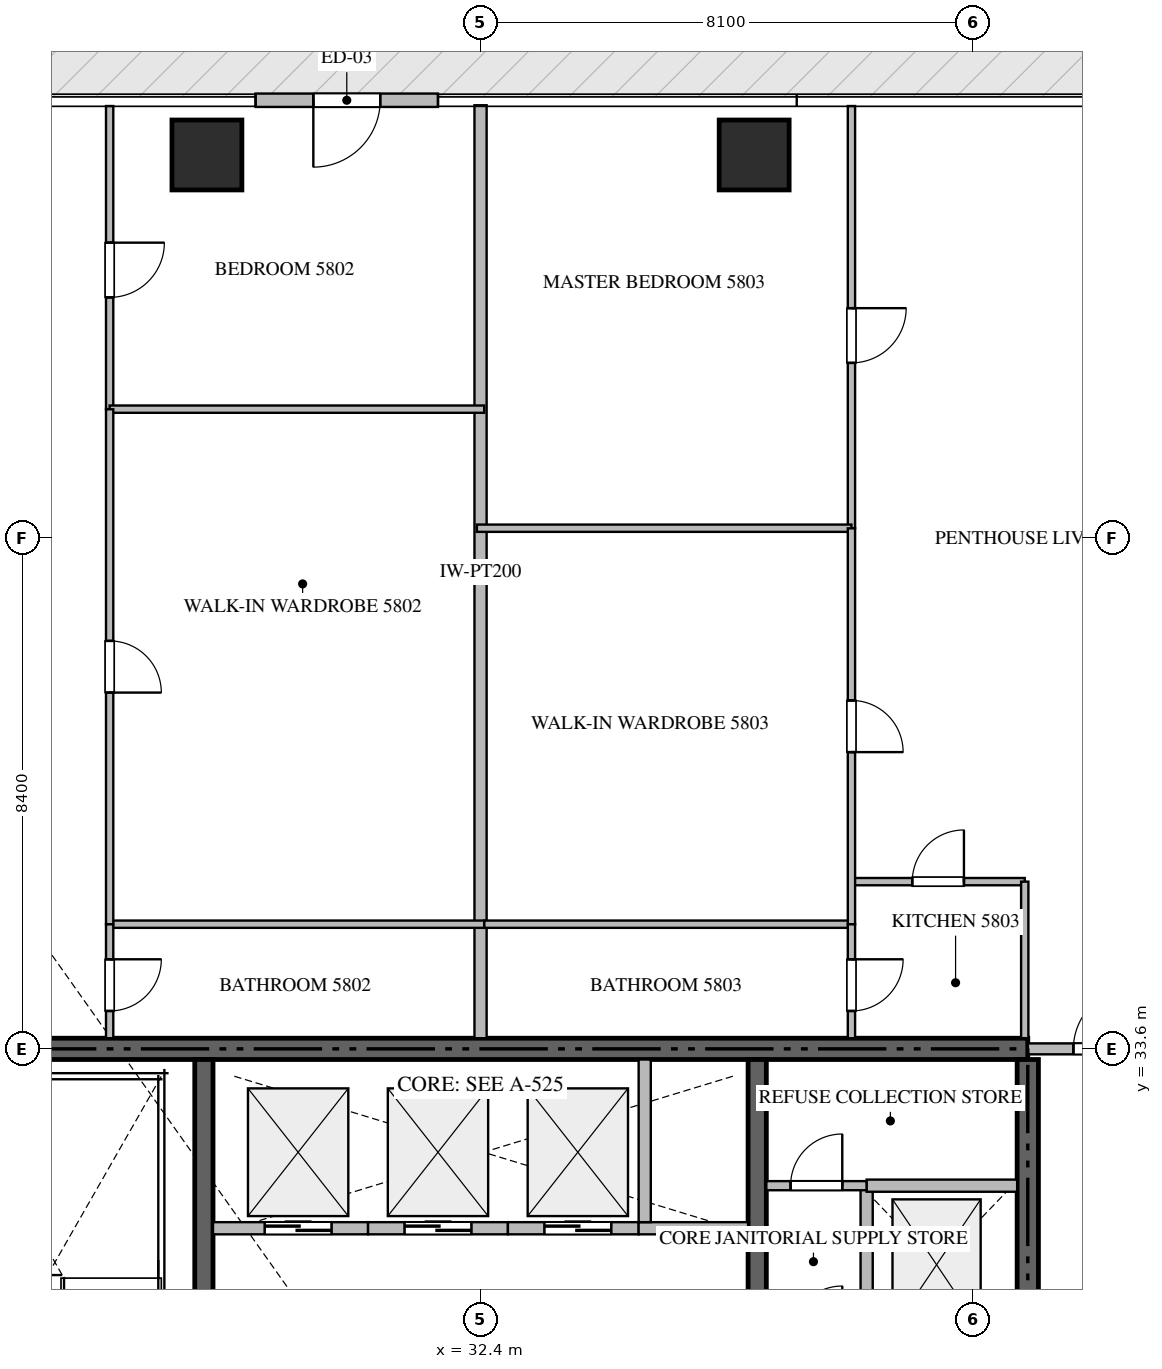
"""IFC4 building model, lengths in metres.
Left out: names, types, materials, properties, quantities, classifications, styles, units other than length and angle.
Written with IfcOpenShell. Run it as: python <this file> out.ifc"""

import sys

from ifc_helpers import new_model, si_unit, direction, frame, frame_2d, origin, origin_2d, place, context, subcontext, project, spatial, rectangle, extrude, source, transform, mapped, element, fill, save


model = new_model("IFC4")
c1 = context("Model", 3, precision=1e-05, world=origin(), true_north=direction((0.0, 1.0)))
c2 = subcontext(c1, "Body", "Model", "MODEL_VIEW")
j1 = project(units=[si_unit("LENGTHUNIT", "METRE"), si_unit("PLANEANGLEUNIT", "RADIAN")], contexts=[c1])
p1 = place(None, origin())
s1 = spatial("IfcSite", under=j1, at=p1, CompositionType="ELEMENT")
p2 = place(p1, origin())
s2 = spatial("IfcBuilding", under=s1, at=p2, CompositionType="ELEMENT")
p3 = place(p2, frame((0.0, 0.0, 233.55)))
s3 = spatial("IfcBuildingStorey", under=s2, at=p3, CompositionType="ELEMENT", Elevation=233.55)
p4 = place(p3, frame((41.4, 33.6, -0.26), z_axis=(0.0, 0.0, 1.0), x_axis=(-1.0, 0.0, 0.0)))
e1 = element("IfcWall", 1, at=p4, inside=s3, PredefinedType="SHEAR", context=c2, shape_type="SweptSolid", body=[
    extrude(rectangle(XDim=18.0, YDim=0.35, at=frame_2d((9.0, 0.0))), origin(), (0.0, 0.0, 1.0), 3.848),
])
p5 = place(p3, frame((41.4, 27.75, -0.26), z_axis=(0.0, 0.0, 1.0), x_axis=(0.0, 1.0, 0.0)))
e2 = element("IfcWall", 2, at=p5, inside=s3, PredefinedType="SHEAR", context=c2, shape_type="SweptSolid", body=[
    extrude(rectangle(XDim=5.675, YDim=0.35, at=frame_2d((2.837, 0.0))), origin(), (0.0, 0.0, 1.0), 3.848),
])
p6 = place(p3, frame((27.85, 23.55, -0.26), z_axis=(0.0, 0.0, 1.0), x_axis=(0.0, 1.0, 0.0)))
e3 = element("IfcWall", 3, at=p6, inside=s3, PredefinedType="SHEAR", context=c2, shape_type="SweptSolid", body=[
    extrude(rectangle(XDim=9.875, YDim=0.3, at=frame_2d((4.938, 0.0))), origin(), (0.0, 0.0, 1.0), 3.848),
])
p7 = place(p3, frame((36.95, 27.05, -0.26), z_axis=(0.0, 0.0, 1.0), x_axis=(0.0, 1.0, 0.0)))
e4 = element("IfcWall", 4, at=p7, inside=s3, PredefinedType="SHEAR", context=c2, shape_type="SweptSolid", body=[
    extrude(rectangle(XDim=6.375, YDim=0.3, at=frame_2d((3.188, 0.0))), origin(), (0.0, 0.0, 1.0), 3.848),
])
m1 = source(origin(), c2, "Body", "SweptSolid", [
    extrude(rectangle(XDim=1.15, YDim=1.15, at=origin_2d()), origin(), (0.0, 0.0, 1.0), 3.85),
])
for number, where, z_axis, x_axis in (
    (5, (27.9, 48.3, -0.26), (0.0, 0.0, 1.0), (1.0, 0.0, 0.0)),
    (6, (36.9, 48.3, -0.26), (0.0, 0.0, 1.0), (1.0, 0.0, 0.0)),
):
    element("IfcColumn", number, at=place(p3, frame(where, z_axis=z_axis, x_axis=x_axis)), inside=s3, PredefinedType="COLUMN", context=c2, shape_type="MappedRepresentation", body=[
        mapped(m1, transform((0.0, 0.0, 0.0), scale=1.0)),
    ])
p8 = place(p3, frame((31.7, 49.2, 0.0), z_axis=(0.0, 0.0, 1.0), x_axis=(-1.0, 0.0, 0.0)))
e7 = element("IfcWall", 7, at=p8, inside=s3, PredefinedType="ELEMENTEDWALL", context=c2, shape_type="SweptSolid", body=[
    extrude(rectangle(XDim=3.0, YDim=0.22, at=frame_2d((1.5, 0.0))), origin(), (0.0, 0.0, 1.0), 3.575),
])
p9 = place(p8, frame((0.95, 0.0, 0.0)))
e8 = element("IfcOpeningElement", 8, at=p9, cuts=e7, PredefinedType="OPENING", context=c2, shape_type="SweptSolid", body=[
    extrude(rectangle(XDim=1.1, YDim=2.2, at=frame_2d((0.55, 1.1))), frame((0.0, 0.12, 0.0), z_axis=(0.0, -1.0, 0.0), x_axis=(1.0, 0.0, 0.0)), (0.0, 0.0, 1.0), 0.24),
])
p10 = place(p3, frame((28.0, 30.65, 0.0), z_axis=(0.0, 0.0, 1.0), x_axis=(1.0, 0.0, 0.0)))
e9 = element("IfcWall", 9, at=p10, inside=s3, PredefinedType="STANDARD", context=c2, shape_type="SweptSolid", body=[
    extrude(rectangle(XDim=2.55, YDim=0.2, at=frame_2d((1.275, 0.0))), origin(), (0.0, 0.0, 1.0), 3.59),
])
p11 = place(p10, frame((0.85, 0.0, 0.0)))
e10 = element("IfcOpeningElement", 10, at=p11, cuts=e9, PredefinedType="OPENING", context=c2, shape_type="SweptSolid", body=[
    extrude(rectangle(XDim=1.1, YDim=2.2, at=frame_2d((0.55, 1.1))), frame((0.0, 0.11, 0.0), z_axis=(0.0, -1.0, 0.0), x_axis=(1.0, 0.0, 0.0)), (0.0, 0.0, 1.0), 0.22),
])
p12 = place(p3, frame((30.55, 30.65, 0.0), z_axis=(0.0, 0.0, 1.0), x_axis=(1.0, 0.0, 0.0)))
e11 = element("IfcWall", 11, at=p12, inside=s3, PredefinedType="STANDARD", context=c2, shape_type="SweptSolid", body=[
    extrude(rectangle(XDim=2.3, YDim=0.2, at=frame_2d((1.15, 0.0))), origin(), (0.0, 0.0, 1.0), 3.59),
])
p13 = place(p12, frame((0.6, 0.0, 0.0)))
e12 = element("IfcOpeningElement", 12, at=p13, cuts=e11, PredefinedType="OPENING", context=c2, shape_type="SweptSolid", body=[
    extrude(rectangle(XDim=1.1, YDim=2.2, at=frame_2d((0.55, 1.1))), frame((0.0, 0.11, 0.0), z_axis=(0.0, -1.0, 0.0), x_axis=(1.0, 0.0, 0.0)), (0.0, 0.0, 1.0), 0.22),
])
p14 = place(p3, frame((32.85, 30.65, 0.0), z_axis=(0.0, 0.0, 1.0), x_axis=(1.0, 0.0, 0.0)))
e13 = element("IfcWall", 13, at=p14, inside=s3, PredefinedType="STANDARD", context=c2, shape_type="SweptSolid", body=[
    extrude(rectangle(XDim=2.15, YDim=0.2, at=frame_2d((1.075, 0.0))), origin(), (0.0, 0.0, 1.0), 3.59),
])
p15 = place(p14, frame((0.6, 0.0, 0.0)))
e14 = element("IfcOpeningElement", 14, at=p15, cuts=e13, PredefinedType="OPENING", context=c2, shape_type="SweptSolid", body=[
    extrude(rectangle(XDim=1.1, YDim=2.2, at=frame_2d((0.55, 1.1))), frame((0.0, 0.11, 0.0), z_axis=(0.0, -1.0, 0.0), x_axis=(1.0, 0.0, 0.0)), (0.0, 0.0, 1.0), 0.22),
])
p16 = place(p3, frame((35.0, 30.65, 0.0), z_axis=(0.0, 0.0, 1.0), x_axis=(1.0, 0.0, 0.0)))
e15 = element("IfcWall", 15, at=p16, inside=s3, PredefinedType="STANDARD", context=c2, shape_type="SweptSolid", body=[
    extrude(rectangle(XDim=1.8, YDim=0.2, at=frame_2d((0.9, 0.0))), origin(), (0.0, 0.0, 1.0), 3.59),
])
p17 = place(p3, frame((35.1, 30.75, 0.0), z_axis=(0.0, 0.0, 1.0), x_axis=(0.0, 1.0, 0.0)))
e16 = element("IfcWall", 16, at=p17, inside=s3, PredefinedType="STANDARD", context=c2, shape_type="SweptSolid", body=[
    extrude(rectangle(XDim=2.675, YDim=0.2, at=frame_2d((1.337, 0.0))), origin(), (0.0, 0.0, 1.0), 3.59),
])
p18 = place(p3, frame((38.75, 28.85, 0.0), z_axis=(0.0, 0.0, 1.0), x_axis=(0.0, 1.0, 0.0)))
e17 = element("IfcWall", 17, at=p18, inside=s3, PredefinedType="STANDARD", context=c2, shape_type="SweptSolid", body=[
    extrude(rectangle(XDim=2.5, YDim=0.2, at=frame_2d((1.25, 0.0))), origin(), (0.0, 0.0, 1.0), 3.59),
])
p19 = place(p3, frame((38.75, 31.35, 0.0), z_axis=(0.0, 0.0, 1.0), x_axis=(1.0, 0.0, 0.0)))
e18 = element("IfcWall", 18, at=p19, inside=s3, PredefinedType="STANDARD", context=c2, shape_type="SweptSolid", body=[
    extrude(rectangle(XDim=2.475, YDim=0.2, at=frame_2d((1.238, 0.0))), origin(), (0.0, 0.0, 1.0), 3.59),
])
p20 = place(p3, frame((37.1, 31.35, 0.0), z_axis=(0.0, 0.0, 1.0), x_axis=(1.0, 0.0, 0.0)))
e19 = element("IfcWall", 19, at=p20, inside=s3, PredefinedType="PARTITIONING", context=c2, shape_type="SweptSolid", body=[
    extrude(rectangle(XDim=1.648, YDim=0.15, at=frame_2d((0.824, 0.0))), origin(), (0.0, 0.0, 1.0), 3.59),
])
p21 = place(p20, frame((0.399, 0.0, 0.0)))
e20 = element("IfcOpeningElement", 20, at=p21, cuts=e19, PredefinedType="OPENING", context=c2, shape_type="SweptSolid", body=[
    extrude(rectangle(XDim=0.85, YDim=2.1, at=frame_2d((0.425, 1.05))), frame((0.0, 0.085, 0.0), z_axis=(0.0, -1.0, 0.0), x_axis=(1.0, 0.0, 0.0)), (0.0, 0.0, 1.0), 0.17),
])
p22 = place(p3, frame((32.4, 33.775, 0.0), z_axis=(0.0, 0.0, 1.0), x_axis=(0.0, 1.0, 0.0)))
e21 = element("IfcWall", 21, at=p22, inside=s3, PredefinedType="PARTITIONING", context=c2, shape_type="SweptSolid", body=[
    extrude(rectangle(XDim=15.343, YDim=0.2, at=frame_2d((7.671, 0.0))), origin(), (0.0, 0.0, 1.0), 3.59),
])
p23 = place(p3, frame((41.402, 33.6, 0.0), z_axis=(0.0, 0.0, 1.0), x_axis=(1.0, 0.0, 0.0)))
e22 = element("IfcWall", 22, at=p23, inside=s3, PredefinedType="PARTITIONING", context=c2, shape_type="SweptSolid", body=[
    extrude(rectangle(XDim=2.496, YDim=0.18, at=frame_2d((1.248, 0.0))), origin(), (0.0, 0.0, 1.0), 3.59),
])
p24 = place(p23, frame((0.748, 0.0, 0.0)))
e23 = element("IfcOpeningElement", 23, at=p24, cuts=e22, PredefinedType="OPENING", context=c2, shape_type="SweptSolid", body=[
    extrude(rectangle(XDim=1.0, YDim=2.15, at=frame_2d((0.5, 1.075))), frame((0.0, 0.1, 0.0), z_axis=(0.0, -1.0, 0.0), x_axis=(1.0, 0.0, 0.0)), (0.0, 0.0, 1.0), 0.2),
])
p25 = place(p3, frame((26.3, 49.105, 0.0), z_axis=(0.0, 0.0, 1.0), x_axis=(0.0, -1.0, 0.0)))
e24 = element("IfcWall", 24, at=p25, inside=s3, PredefinedType="PARTITIONING", context=c2, shape_type="SweptSolid", body=[
    extrude(rectangle(XDim=4.985, YDim=0.12, at=frame_2d((2.492, 0.0))), origin(), (0.0, 0.0, 1.0), 3.59),
])
p26 = place(p25, frame((2.247, 0.0, 0.0)))
e25 = element("IfcOpeningElement", 25, at=p26, cuts=e24, PredefinedType="OPENING", context=c2, shape_type="SweptSolid", body=[
    extrude(rectangle(XDim=0.9, YDim=2.1, at=frame_2d((0.45, 1.05))), frame((0.0, 0.07, 0.0), z_axis=(0.0, -1.0, 0.0), x_axis=(1.0, 0.0, 0.0)), (0.0, 0.0, 1.0), 0.14),
])
for number, where, z_axis, x_axis in (
    (26, (26.3, 44.12, 0.0), (0.0, 0.0, 1.0), (1.0, 0.0, 0.0)),
    (27, (26.3, 35.65, 0.0), (0.0, 0.0, 1.0), (1.0, 0.0, 0.0)),
):
    element("IfcWall", number, at=place(p3, frame(where, z_axis=z_axis, x_axis=x_axis)), inside=s3, PredefinedType="PARTITIONING", context=c2, shape_type="SweptSolid", body=[
        extrude(rectangle(XDim=6.16, YDim=0.12, at=frame_2d((3.08, 0.0))), origin(), (0.0, 0.0, 1.0), 3.59),
    ])
p27 = place(p3, frame((26.3, 44.118, 0.0), z_axis=(0.0, 0.0, 1.0), x_axis=(0.0, -1.0, 0.0)))
e28 = element("IfcWall", 28, at=p27, inside=s3, PredefinedType="PARTITIONING", context=c2, shape_type="SweptSolid", body=[
    extrude(rectangle(XDim=8.468, YDim=0.12, at=frame_2d((4.234, 0.0))), origin(), (0.0, 0.0, 1.0), 3.59),
])
p28 = place(p27, frame((3.809, 0.0, 0.0)))
e29 = element("IfcOpeningElement", 29, at=p28, cuts=e28, PredefinedType="OPENING", context=c2, shape_type="SweptSolid", body=[
    extrude(rectangle(XDim=0.85, YDim=2.1, at=frame_2d((0.425, 1.05))), frame((0.0, 0.07, 0.0), z_axis=(0.0, -1.0, 0.0), x_axis=(1.0, 0.0, 0.0)), (0.0, 0.0, 1.0), 0.14),
])
p29 = place(p3, frame((26.3, 35.648, 0.0), z_axis=(0.0, 0.0, 1.0), x_axis=(0.0, -1.0, 0.0)))
e30 = element("IfcWall", 30, at=p29, inside=s3, PredefinedType="PARTITIONING", context=c2, shape_type="SweptSolid", body=[
    extrude(rectangle(XDim=1.873, YDim=0.12, at=frame_2d((0.937, 0.0))), origin(), (0.0, 0.0, 1.0), 3.59),
])
p30 = place(p29, frame((0.575, 0.0, 0.0)))
e31 = element("IfcOpeningElement", 31, at=p30, cuts=e30, PredefinedType="OPENING", context=c2, shape_type="SweptSolid", body=[
    extrude(rectangle(XDim=0.85, YDim=2.1, at=frame_2d((0.425, 1.05))), frame((0.0, 0.07, 0.0), z_axis=(0.0, -1.0, 0.0), x_axis=(1.0, 0.0, 0.0)), (0.0, 0.0, 1.0), 0.14),
])
p31 = place(p3, frame((38.5, 36.35, 0.0), z_axis=(0.0, 0.0, 1.0), x_axis=(1.0, 0.0, 0.0)))
e32 = element("IfcWall", 32, at=p31, inside=s3, PredefinedType="PARTITIONING", context=c2, shape_type="SweptSolid", body=[
    extrude(rectangle(XDim=2.85, YDim=0.12, at=frame_2d((1.425, 0.0))), origin(), (0.0, 0.0, 1.0), 3.59),
])
p32 = place(p31, frame((1.0, 0.0, 0.0)))
e33 = element("IfcOpeningElement", 33, at=p32, cuts=e32, PredefinedType="OPENING", context=c2, shape_type="SweptSolid", body=[
    extrude(rectangle(XDim=0.85, YDim=2.1, at=frame_2d((0.425, 1.05))), frame((0.0, 0.07, 0.0), z_axis=(0.0, -1.0, 0.0), x_axis=(1.0, 0.0, 0.0)), (0.0, 0.0, 1.0), 0.14),
])
p33 = place(p3, frame((41.35, 36.35, 0.0), z_axis=(0.0, 0.0, 1.0), x_axis=(0.0, -1.0, 0.0)))
e34 = element("IfcWall", 34, at=p33, inside=s3, PredefinedType="PARTITIONING", context=c2, shape_type="SweptSolid", body=[
    extrude(rectangle(XDim=2.575, YDim=0.12, at=frame_2d((1.288, 0.0))), origin(), (0.0, 0.0, 1.0), 3.59),
])
p34 = place(p3, frame((38.5, 49.105, 0.0), z_axis=(0.0, 0.0, 1.0), x_axis=(0.0, -1.0, 0.0)))
e35 = element("IfcWall", 35, at=p34, inside=s3, PredefinedType="PARTITIONING", context=c2, shape_type="SweptSolid", body=[
    extrude(rectangle(XDim=6.943, YDim=0.12, at=frame_2d((3.471, 0.0))), origin(), (0.0, 0.0, 1.0), 3.59),
])
p35 = place(p34, frame((3.324, 0.0, 0.0)))
e36 = element("IfcOpeningElement", 36, at=p35, cuts=e35, PredefinedType="OPENING", context=c2, shape_type="SweptSolid", body=[
    extrude(rectangle(XDim=0.9, YDim=2.1, at=frame_2d((0.45, 1.05))), frame((0.0, 0.07, 0.0), z_axis=(0.0, -1.0, 0.0), x_axis=(1.0, 0.0, 0.0)), (0.0, 0.0, 1.0), 0.14),
])
p36 = place(p3, frame((32.34, 42.162, 0.0), z_axis=(0.0, 0.0, 1.0), x_axis=(1.0, 0.0, 0.0)))
e37 = element("IfcWall", 37, at=p36, inside=s3, PredefinedType="PARTITIONING", context=c2, shape_type="SweptSolid", body=[
    extrude(rectangle(XDim=6.16, YDim=0.12, at=frame_2d((3.08, 0.0))), origin(), (0.0, 0.0, 1.0), 3.59),
])
p37 = place(p3, frame((32.462, 35.65, 0.0), z_axis=(0.0, 0.0, 1.0), x_axis=(1.0, 0.0, 0.0)))
e38 = element("IfcWall", 38, at=p37, inside=s3, PredefinedType="PARTITIONING", context=c2, shape_type="SweptSolid", body=[
    extrude(rectangle(XDim=6.038, YDim=0.12, at=frame_2d((3.019, 0.0))), origin(), (0.0, 0.0, 1.0), 3.59),
])
p38 = place(p3, frame((38.5, 42.16, 0.0), z_axis=(0.0, 0.0, 1.0), x_axis=(0.0, -1.0, 0.0)))
e39 = element("IfcWall", 39, at=p38, inside=s3, PredefinedType="PARTITIONING", context=c2, shape_type="SweptSolid", body=[
    extrude(rectangle(XDim=6.51, YDim=0.12, at=frame_2d((3.255, 0.0))), origin(), (0.0, 0.0, 1.0), 3.59),
])
p39 = place(p38, frame((2.83, 0.0, 0.0)))
e40 = element("IfcOpeningElement", 40, at=p39, cuts=e39, PredefinedType="OPENING", context=c2, shape_type="SweptSolid", body=[
    extrude(rectangle(XDim=0.85, YDim=2.1, at=frame_2d((0.425, 1.05))), frame((0.0, 0.07, 0.0), z_axis=(0.0, -1.0, 0.0), x_axis=(1.0, 0.0, 0.0)), (0.0, 0.0, 1.0), 0.14),
])
p40 = place(p3, frame((38.5, 35.648, 0.0), z_axis=(0.0, 0.0, 1.0), x_axis=(0.0, -1.0, 0.0)))
e41 = element("IfcWall", 41, at=p40, inside=s3, PredefinedType="PARTITIONING", context=c2, shape_type="SweptSolid", body=[
    extrude(rectangle(XDim=1.873, YDim=0.12, at=frame_2d((0.937, 0.0))), origin(), (0.0, 0.0, 1.0), 3.59),
])
p41 = place(p40, frame((0.575, 0.0, 0.0)))
e42 = element("IfcOpeningElement", 42, at=p41, cuts=e41, PredefinedType="OPENING", context=c2, shape_type="SweptSolid", body=[
    extrude(rectangle(XDim=0.85, YDim=2.1, at=frame_2d((0.425, 1.05))), frame((0.0, 0.07, 0.0), z_axis=(0.0, -1.0, 0.0), x_axis=(1.0, 0.0, 0.0)), (0.0, 0.0, 1.0), 0.14),
])
m2 = source(origin(), c2, "Body", "SweptSolid", [
    extrude(rectangle(XDim=1.1, YDim=2.2, at=frame_2d((0.55, 1.1))), frame((0.0, 0.025, 0.0), z_axis=(0.0, -1.0, 0.0), x_axis=(1.0, 0.0, 0.0)), (0.0, 0.0, 1.0), 0.05),
])
p42 = place(p9, origin())
e43 = element("IfcDoor", 43, at=p42, inside=s3, OperationType="SINGLE_SWING_RIGHT", PredefinedType="DOOR", context=c2, shape_type="MappedRepresentation", body=[
    mapped(m2, transform((0.0, 0.0, 0.0), scale=1.0)),
])
fill(e8, e43)
p43 = place(p11, origin())
e44 = element("IfcDoor", 44, at=p43, inside=s3, OperationType="DOUBLE_DOOR_SLIDING", PredefinedType="DOOR", context=c2, shape_type="MappedRepresentation", body=[
    mapped(m2, transform((0.0, 0.0, 0.0), scale=1.0)),
])
fill(e10, e44)
p44 = place(p13, origin())
e45 = element("IfcDoor", 45, at=p44, inside=s3, OperationType="DOUBLE_DOOR_SLIDING", PredefinedType="DOOR", context=c2, shape_type="MappedRepresentation", body=[
    mapped(m2, transform((0.0, 0.0, 0.0), scale=1.0)),
])
fill(e12, e45)
p45 = place(p15, origin())
e46 = element("IfcDoor", 46, at=p45, inside=s3, OperationType="DOUBLE_DOOR_SLIDING", PredefinedType="DOOR", context=c2, shape_type="MappedRepresentation", body=[
    mapped(m2, transform((0.0, 0.0, 0.0), scale=1.0)),
])
fill(e14, e46)
m3 = source(origin(), c2, "Body", "SweptSolid", [
    extrude(rectangle(XDim=0.85, YDim=2.1, at=frame_2d((0.425, 1.05))), frame((0.0, 0.025, 0.0), z_axis=(0.0, -1.0, 0.0), x_axis=(1.0, 0.0, 0.0)), (0.0, 0.0, 1.0), 0.05),
])
p46 = place(p21, origin())
e47 = element("IfcDoor", 47, at=p46, inside=s3, OperationType="SINGLE_SWING_RIGHT", PredefinedType="DOOR", context=c2, shape_type="MappedRepresentation", body=[
    mapped(m3, transform((0.0, 0.0, 0.0), scale=1.0)),
])
fill(e20, e47)
m4 = source(origin(), c2, "Body", "SweptSolid", [
    extrude(rectangle(XDim=1.0, YDim=2.15, at=frame_2d((0.5, 1.075))), frame((0.0, 0.025, 0.0), z_axis=(0.0, -1.0, 0.0), x_axis=(1.0, 0.0, 0.0)), (0.0, 0.0, 1.0), 0.05),
])
p47 = place(p24, origin())
e48 = element("IfcDoor", 48, at=p47, inside=s3, OperationType="SINGLE_SWING_RIGHT", PredefinedType="DOOR", context=c2, shape_type="MappedRepresentation", body=[
    mapped(m4, transform((0.0, 0.0, 0.0), scale=1.0)),
])
fill(e23, e48)
m5 = source(origin(), c2, "Body", "SweptSolid", [
    extrude(rectangle(XDim=0.9, YDim=2.1, at=frame_2d((0.45, 1.05))), frame((0.0, 0.025, 0.0), z_axis=(0.0, -1.0, 0.0), x_axis=(1.0, 0.0, 0.0)), (0.0, 0.0, 1.0), 0.05),
])
p48 = place(p26, origin())
e49 = element("IfcDoor", 49, at=p48, inside=s3, OperationType="SINGLE_SWING_LEFT", PredefinedType="DOOR", context=c2, shape_type="MappedRepresentation", body=[
    mapped(m5, transform((0.0, 0.0, 0.0), scale=1.0)),
])
fill(e25, e49)
p49 = place(p28, origin())
e50 = element("IfcDoor", 50, at=p49, inside=s3, OperationType="SINGLE_SWING_RIGHT", PredefinedType="DOOR", context=c2, shape_type="MappedRepresentation", body=[
    mapped(m3, transform((0.0, 0.0, 0.0), scale=1.0)),
])
fill(e29, e50)
p50 = place(p30, origin())
e51 = element("IfcDoor", 51, at=p50, inside=s3, OperationType="SINGLE_SWING_LEFT", PredefinedType="DOOR", context=c2, shape_type="MappedRepresentation", body=[
    mapped(m3, transform((0.0, 0.0, 0.0), scale=1.0)),
])
fill(e31, e51)
p51 = place(p32, origin())
e52 = element("IfcDoor", 52, at=p51, inside=s3, OperationType="SINGLE_SWING_RIGHT", PredefinedType="DOOR", context=c2, shape_type="MappedRepresentation", body=[
    mapped(m3, transform((0.0, 0.0, 0.0), scale=1.0)),
])
fill(e33, e52)
p52 = place(p35, origin())
e53 = element("IfcDoor", 53, at=p52, inside=s3, OperationType="SINGLE_SWING_LEFT", PredefinedType="DOOR", context=c2, shape_type="MappedRepresentation", body=[
    mapped(m5, transform((0.0, 0.0, 0.0), scale=1.0)),
])
fill(e36, e53)
p53 = place(p39, origin())
e54 = element("IfcDoor", 54, at=p53, inside=s3, OperationType="SINGLE_SWING_RIGHT", PredefinedType="DOOR", context=c2, shape_type="MappedRepresentation", body=[
    mapped(m3, transform((0.0, 0.0, 0.0), scale=1.0)),
])
fill(e40, e54)
p54 = place(p41, origin())
e55 = element("IfcDoor", 55, at=p54, inside=s3, OperationType="SINGLE_SWING_LEFT", PredefinedType="DOOR", context=c2, shape_type="MappedRepresentation", body=[
    mapped(m3, transform((0.0, 0.0, 0.0), scale=1.0)),
])
fill(e42, e55)
save(model, sys.argv[1])
